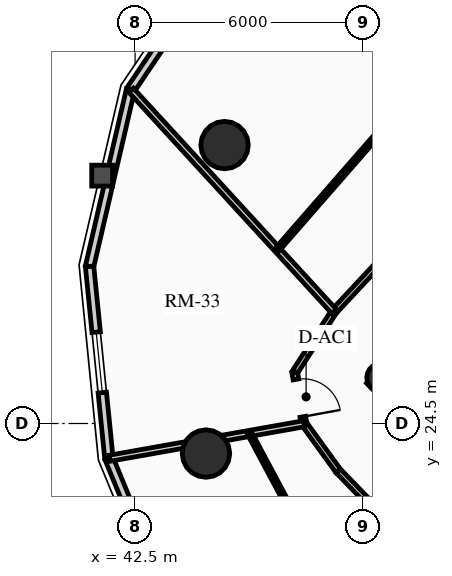
"""IFC4 building model, lengths in metres.
Left out: names, types, materials, properties, quantities, classifications, styles, units other than length and angle.
Written with IfcOpenShell. Run it as: python <this file> out.ifc"""

import sys

from ifc_helpers import new_model, si_unit, direction, frame, frame_2d, origin, origin_2d, place, context, subcontext, project, spatial, rectangle, circle, hollow_circle, extrude, source, transform, mapped, element, fill, save


model = new_model("IFC4")
c1 = context("Model", 3, precision=1e-05, world=origin(), true_north=direction((0.0, 1.0)))
c2 = subcontext(c1, "Body", "Model", "MODEL_VIEW")
j1 = project(units=[si_unit("LENGTHUNIT", "METRE"), si_unit("PLANEANGLEUNIT", "RADIAN")], contexts=[c1])
p1 = place(None, origin())
s1 = spatial("IfcSite", under=j1, at=p1, CompositionType="ELEMENT")
p2 = place(p1, origin())
s2 = spatial("IfcBuilding", under=s1, at=p2, CompositionType="ELEMENT")
p3 = place(p2, frame((0.0, 0.0, 163.24)))
s3 = spatial("IfcBuildingStorey", under=s2, at=p3, CompositionType="ELEMENT", Elevation=163.24)
p4 = place(p3, frame((58.702, 15.732, 0.0), z_axis=(0.0, 0.0, 1.0), x_axis=(-0.707106781187, 0.707106781187, 0.0)))
e1 = element("IfcWall", 1, at=p4, inside=s3, PredefinedType="SHEAR", context=c2, shape_type="SweptSolid", body=[
    extrude(rectangle(XDim=14.1, YDim=0.4, at=frame_2d((7.05, 0.0))), origin(), (0.0, 0.0, 1.0), 2.91),
])
p5 = place(p3, frame((48.873, 25.561, 0.0), z_axis=(0.0, 0.0, 1.0), x_axis=(0.707106781187, 0.707106781187, 0.0)))
e2 = element("IfcWall", 2, at=p5, inside=s3, PredefinedType="SHEAR", context=c2, shape_type="SweptSolid", body=[
    extrude(rectangle(XDim=10.7, YDim=0.4, at=frame_2d((5.35, 0.0))), origin(), (0.0, 0.0, 1.0), 2.91),
])
m1 = source(origin(), c2, "Body", "SweptSolid", [
    extrude(rectangle(XDim=1.5, YDim=2.02, at=frame_2d((0.75, 1.01))), frame((0.0, 0.21, 0.0), z_axis=(0.0, -1.0, 0.0), x_axis=(1.0, 0.0, 0.0)), (0.0, 0.0, 1.0), 0.42),
])
p6 = place(p5, frame((4.6, 0.0, 0.0)))
e3 = element("IfcOpeningElement", 3, at=p6, cuts=e2, PredefinedType="OPENING", context=c2, shape_type="MappedRepresentation", body=[
    mapped(m1, transform((0.0, 0.0, 0.0), x_axis=(1.0, 0.0, 0.0), y_axis=(0.0, 1.0, 0.0), z_axis=(0.0, 0.0, 1.0), scale=1.0)),
])
p7 = place(p3, frame((48.976, 25.706, 0.0), z_axis=(0.0, 0.0, 1.0), x_axis=(0.707106781187, 0.707106781187, 0.0)))
e4 = element("IfcColumn", 4, at=p7, inside=s3, PredefinedType="COLUMN", context=c2, shape_type="SweptSolid", body=[
    extrude(hollow_circle(Radius=0.38, WallThickness=0.032, at=origin_2d()), origin(), (0.0, 0.0, 1.0), 2.91),
])
for number, where, z_axis, x_axis in (
    (5, (44.854, 31.827, 0.0), (0.0, 0.0, 1.0), (1.0, 0.0, 0.0)),
    (6, (44.365, 23.709, 0.0), (0.0, 0.0, 1.0), (1.0, 0.0, 0.0)),
):
    element("IfcColumn", number, at=place(p3, frame(where, z_axis=z_axis, x_axis=x_axis)), inside=s3, PredefinedType="USERDEFINED", context=c2, shape_type="SweptSolid", body=[
        extrude(circle(Radius=0.625, at=origin_2d()), origin(), (0.0, 0.0, 1.0), 2.91),
    ])
p8 = place(p3, frame((42.378, 33.279, 0.0), z_axis=(0.0, 0.0, 1.0), x_axis=(0.559635286042, 0.828739009952, 0.0)))
e7 = element("IfcWall", 7, at=p8, inside=s3, PredefinedType="SOLIDWALL", context=c2, shape_type="SweptSolid", body=[
    extrude(rectangle(XDim=4.569, YDim=0.22, at=frame_2d((2.284, 0.0))), origin(), (0.0, 0.0, 1.0), 2.245),
])
m2 = source(origin(), c2, "Body", "SweptSolid", [
    extrude(rectangle(XDim=1.6, YDim=1.3, at=frame_2d((0.8, 0.65))), frame((0.0, 0.12, 0.0), z_axis=(0.0, -1.0, 0.0), x_axis=(1.0, 0.0, 0.0)), (0.0, 0.0, 1.0), 0.24),
])
p9 = place(p8, frame((1.484, 0.0, 0.65)))
e8 = element("IfcOpeningElement", 8, at=p9, cuts=e7, PredefinedType="OPENING", context=c2, shape_type="MappedRepresentation", body=[
    mapped(m2, transform((0.0, 0.0, 0.0), x_axis=(1.0, 0.0, 0.0), y_axis=(0.0, 1.0, 0.0), z_axis=(0.0, 0.0, 1.0), scale=1.0)),
])
p10 = place(p3, frame((41.302, 28.633, 0.0), z_axis=(0.0, 0.0, 1.0), x_axis=(0.225659540039, 0.974206226622, 0.0)))
e9 = element("IfcWall", 9, at=p10, inside=s3, PredefinedType="SOLIDWALL", context=c2, shape_type="SweptSolid", body=[
    extrude(rectangle(XDim=4.769, YDim=0.22, at=frame_2d((2.385, 0.0))), origin(), (0.0, 0.0, 1.0), 2.245),
])
p11 = place(p3, frame((41.811, 23.582, 0.0), z_axis=(0.0, 0.0, 1.0), x_axis=(-0.100279889424, 0.994959267396, 0.0)))
e10 = element("IfcWall", 10, at=p11, inside=s3, PredefinedType="SOLIDWALL", context=c2, shape_type="SweptSolid", body=[
    extrude(rectangle(XDim=5.076, YDim=0.22, at=frame_2d((2.538, 0.0))), origin(), (0.0, 0.0, 1.0), 2.245),
])
p12 = place(p11, frame((1.738, 0.0, 0.65)))
e11 = element("IfcOpeningElement", 11, at=p12, cuts=e10, PredefinedType="OPENING", context=c2, shape_type="MappedRepresentation", body=[
    mapped(m2, transform((0.0, 0.0, 0.0), x_axis=(1.0, 0.0, 0.0), y_axis=(0.0, 1.0, 0.0), z_axis=(0.0, 0.0, 1.0), scale=1.0)),
])
p13 = place(p3, frame((43.856, 18.622, 0.0), z_axis=(0.0, 0.0, 1.0), x_axis=(-0.38111364655, 0.924528197738, 0.0)))
e12 = element("IfcWall", 12, at=p13, inside=s3, PredefinedType="SOLIDWALL", context=c2, shape_type="SweptSolid", body=[
    extrude(rectangle(XDim=5.366, YDim=0.22, at=frame_2d((2.683, 0.0))), origin(), (0.0, 0.0, 1.0), 2.245),
])
p14 = place(p13, frame((1.883, 0.0, 0.65)))
e13 = element("IfcOpeningElement", 13, at=p14, cuts=e12, PredefinedType="OPENING", context=c2, shape_type="MappedRepresentation", body=[
    mapped(m2, transform((0.0, 0.0, 0.0), x_axis=(1.0, 0.0, 0.0), y_axis=(0.0, 1.0, 0.0), z_axis=(0.0, 0.0, 1.0), scale=1.0)),
])
p15 = place(p3, frame((52.135, 32.159, 0.0), z_axis=(0.0, 0.0, 1.0), x_axis=(-0.682546302454, -0.730842353047, 0.0)))
e14 = element("IfcWall", 14, at=p15, inside=s3, PredefinedType="PARTITIONING", context=c2, shape_type="SweptSolid", body=[
    extrude(rectangle(XDim=6.445, YDim=0.15, at=frame_2d((3.223, 0.0))), origin(), (0.0, 0.0, 1.0), 2.245),
])
p16 = place(p3, frame((47.736, 27.449, 0.0), z_axis=(0.0, 0.0, 1.0), x_axis=(-0.542589259408, -0.839998152126, 0.0)))
e15 = element("IfcWall", 15, at=p16, inside=s3, PredefinedType="PARTITIONING", context=c2, shape_type="SweptSolid", body=[
    extrude(rectangle(XDim=1.912, YDim=0.15, at=frame_2d((0.956, 0.0))), origin(), (0.0, 0.0, 1.0), 2.245),
])
p17 = place(p3, frame((46.699, 25.843, 0.0), z_axis=(0.0, 0.0, 1.0), x_axis=(0.180451258011, -0.983583928032, 0.0)))
e16 = element("IfcWall", 16, at=p17, inside=s3, PredefinedType="PARTITIONING", context=c2, shape_type="SweptSolid", body=[
    extrude(rectangle(XDim=1.372, YDim=0.15, at=frame_2d((0.686, 0.0))), origin(), (0.0, 0.0, 1.0), 2.245),
])
m3 = source(origin(), c2, "Body", "SweptSolid", [
    extrude(rectangle(XDim=1.0, YDim=2.015, at=frame_2d((0.5, 1.007))), frame((0.0, 0.085, 0.0), z_axis=(0.0, -1.0, 0.0), x_axis=(1.0, 0.0, 0.0)), (0.0, 0.0, 1.0), 0.17),
])
p18 = place(p17, frame((0.186, 0.0, 0.0)))
e17 = element("IfcOpeningElement", 17, at=p18, cuts=e16, PredefinedType="OPENING", context=c2, shape_type="MappedRepresentation", body=[
    mapped(m3, transform((0.0, 0.0, 0.0), x_axis=(1.0, 0.0, 0.0), y_axis=(0.0, 1.0, 0.0), z_axis=(0.0, 0.0, 1.0), scale=1.0)),
])
p19 = place(p3, frame((46.946, 24.494, 0.0), z_axis=(0.0, 0.0, 1.0), x_axis=(0.586340262528, -0.810064871809, 0.0)))
e18 = element("IfcWall", 18, at=p19, inside=s3, PredefinedType="PARTITIONING", context=c2, shape_type="SweptSolid", body=[
    extrude(rectangle(XDim=1.531, YDim=0.15, at=frame_2d((0.766, 0.0))), origin(), (0.0, 0.0, 1.0), 2.245),
])
p20 = place(p3, frame((47.844, 23.253, 0.0), z_axis=(0.0, 0.0, 1.0), x_axis=(0.696248411352, -0.717800912293, 0.0)))
e19 = element("IfcWall", 19, at=p20, inside=s3, PredefinedType="PARTITIONING", context=c2, shape_type="SweptSolid", body=[
    extrude(rectangle(XDim=5.947, YDim=0.15, at=frame_2d((2.974, 0.0))), origin(), (0.0, 0.0, 1.0), 2.675),
])
p21 = place(p3, frame((47.736, 27.449, 0.0), z_axis=(0.0, 0.0, 1.0), x_axis=(-0.676056254668, 0.736850012231, 0.0)))
e20 = element("IfcWall", 20, at=p21, inside=s3, PredefinedType="PARTITIONING", context=c2, shape_type="SweptSolid", body=[
    extrude(rectangle(XDim=7.899, YDim=0.16, at=frame_2d((3.95, 0.0))), origin(), (0.0, 0.0, 1.0), 2.245),
])
p22 = place(p3, frame((46.946, 24.494, 0.0), z_axis=(0.0, 0.0, 1.0), x_axis=(-0.984604227647, -0.174798497988, 0.0)))
e21 = element("IfcWall", 21, at=p22, inside=s3, PredefinedType="PARTITIONING", context=c2, shape_type="SweptSolid", body=[
    extrude(rectangle(XDim=5.196, YDim=0.16, at=frame_2d((2.598, 0.0))), origin(), (0.0, 0.0, 1.0), 2.245),
])
p23 = place(p3, frame((50.123, 33.529, 0.0), z_axis=(0.0, 0.0, 1.0), x_axis=(-0.657371249324, -0.753566878626, 0.0)))
e22 = element("IfcWall", 22, at=p23, inside=s3, PredefinedType="PARTITIONING", context=c2, shape_type="SweptSolid", body=[
    extrude(rectangle(XDim=5.906, YDim=0.125, at=frame_2d((2.953, 0.0))), origin(), (0.0, 0.0, 1.0), 2.245),
])
p24 = place(p3, frame((45.514, 24.239, 0.0), z_axis=(0.0, 0.0, 1.0), x_axis=(0.471225296528, -0.882012879674, 0.0)))
e23 = element("IfcWall", 23, at=p24, inside=s3, PredefinedType="PARTITIONING", context=c2, shape_type="SweptSolid", body=[
    extrude(rectangle(XDim=2.585, YDim=0.125, at=frame_2d((1.292, 0.0))), origin(), (0.0, 0.0, 1.0), 2.245),
])
m4 = source(origin(), c2, "Body", "SweptSolid", [
    extrude(rectangle(XDim=1.6, YDim=1.3, at=frame_2d((0.8, 0.65))), frame((0.0, 0.03, 0.0), z_axis=(0.0, -1.0, 0.0), x_axis=(1.0, 0.0, 0.0)), (0.0, 0.0, 1.0), 0.06),
])
p25 = place(p12, origin())
e24 = element("IfcWindow", 24, at=p25, inside=s3, PartitioningType="SINGLE_PANEL", PredefinedType="WINDOW", context=c2, shape_type="MappedRepresentation", body=[
    mapped(m4, transform((0.0, 0.0, 0.0), x_axis=(1.0, 0.0, 0.0), y_axis=(0.0, 1.0, 0.0), z_axis=(0.0, 0.0, 1.0), scale=1.0)),
])
fill(e11, e24)
m5 = source(origin(), c2, "Body", "SweptSolid", [
    extrude(rectangle(XDim=1.0, YDim=2.015, at=frame_2d((0.5, 1.007))), frame((0.0, 0.025, 0.0), z_axis=(0.0, -1.0, 0.0), x_axis=(1.0, 0.0, 0.0)), (0.0, 0.0, 1.0), 0.05),
])
p26 = place(p18, origin())
e25 = element("IfcDoor", 25, at=p26, inside=s3, OperationType="SINGLE_SWING_RIGHT", PredefinedType="DOOR", context=c2, shape_type="MappedRepresentation", body=[
    mapped(m5, transform((0.0, 0.0, 0.0), x_axis=(1.0, 0.0, 0.0), y_axis=(0.0, 1.0, 0.0), z_axis=(0.0, 0.0, 1.0), scale=1.0)),
])
fill(e17, e25)
save(model, sys.argv[1])
